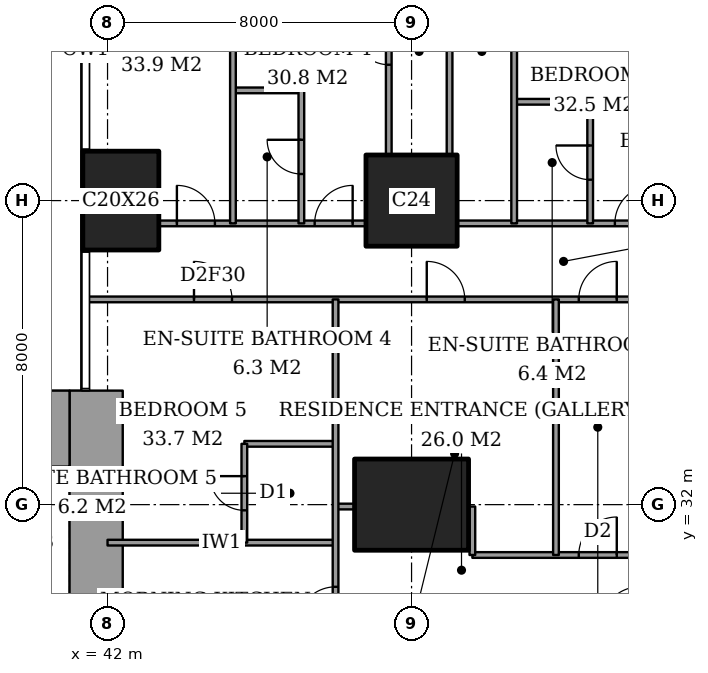
"""IFC4 building model, lengths in metres.
Left out: names, types, materials, properties, quantities, classifications, styles, units other than length and angle.
Written with IfcOpenShell. Run it as: python <this file> out.ifc"""

import sys

from ifc_helpers import new_model, si_unit, direction, frame, frame_2d, origin, origin_2d, place, context, subcontext, project, spatial, rectangle, extrude, element, fill, save


model = new_model("IFC4")
c1 = context("Model", 3, precision=1e-05, world=origin(), true_north=direction((0.0, 1.0)))
c2 = subcontext(c1, "Body", "Model", "MODEL_VIEW")
j1 = project(units=[si_unit("LENGTHUNIT", "METRE"), si_unit("PLANEANGLEUNIT", "RADIAN")], contexts=[c1])
p1 = place(None, origin())
s1 = spatial("IfcSite", under=j1, at=p1, CompositionType="ELEMENT")
p2 = place(p1, origin())
s2 = spatial("IfcBuilding", under=s1, at=p2, CompositionType="ELEMENT")
p3 = place(p2, frame((0.0, 0.0, 255.6)))
s3 = spatial("IfcBuildingStorey", under=s2, at=p3, CompositionType="ELEMENT", Elevation=255.6)
p4 = place(p3, frame((42.35, 40.0, 0.0), z_axis=(0.0, 0.0, 1.0), x_axis=(1.0, 0.0, 0.0)))
e1 = element("IfcColumn", 1, at=p4, inside=s3, PredefinedType="COLUMN", context=c2, shape_type="SweptSolid", body=[
    extrude(rectangle(XDim=2.0, YDim=2.6, at=origin_2d()), origin(), (0.0, 0.0, 1.0), 3.6),
])
p5 = place(p3, frame((50.0, 32.0, 0.0), z_axis=(0.0, 0.0, 1.0), x_axis=(1.0, 0.0, 0.0)))
e2 = element("IfcColumn", 2, at=p5, inside=s3, PredefinedType="COLUMN", context=c2, shape_type="SweptSolid", body=[
    extrude(rectangle(XDim=3.0, YDim=2.4, at=origin_2d()), origin(), (0.0, 0.0, 1.0), 3.6),
])
p6 = place(p3, frame((50.0, 40.0, 0.0), z_axis=(0.0, 0.0, 1.0), x_axis=(1.0, 0.0, 0.0)))
e3 = element("IfcColumn", 3, at=p6, inside=s3, PredefinedType="COLUMN", context=c2, shape_type="SweptSolid", body=[
    extrude(rectangle(XDim=2.4, YDim=2.4, at=origin_2d()), origin(), (0.0, 0.0, 1.0), 3.6),
])
p7 = place(p3, frame((37.85, 34.0, 0.0), z_axis=(0.0, 0.0, 1.0), x_axis=(1.0, 0.0, 0.0)))
e4 = element("IfcWall", 4, at=p7, inside=s3, PredefinedType="SHEAR", context=c2, shape_type="SweptSolid", body=[
    extrude(rectangle(XDim=3.15, YDim=2.0, at=frame_2d((1.575, 0.0))), origin(), (0.0, 0.0, 1.0), 3.6),
])
p8 = place(p3, frame((41.7, 24.85, 0.0), z_axis=(0.0, 0.0, 1.0), x_axis=(0.0, 1.0, 0.0)))
e5 = element("IfcWall", 5, at=p8, inside=s3, PredefinedType="SHEAR", context=c2, shape_type="SweptSolid", body=[
    extrude(rectangle(XDim=10.15, YDim=1.4, at=frame_2d((5.075, 0.0))), origin(), (0.0, 0.0, 1.0), 3.6),
])
p9 = place(p3, frame((51.6, 30.675, 0.0), z_axis=(0.0, 0.0, 1.0), x_axis=(1.0, 0.0, 0.0)))
e6 = element("IfcWall", 6, at=p9, inside=s3, PredefinedType="PARTITIONING", context=c2, shape_type="SweptSolid", body=[
    extrude(rectangle(XDim=4.4, YDim=0.15, at=frame_2d((2.2, 0.0))), origin(), (0.0, 0.0, 1.0), 3.35),
])
p10 = place(p9, frame((2.8, 0.0, 0.0)))
e7 = element("IfcOpeningElement", 7, at=p10, cuts=e6, PredefinedType="OPENING", context=c2, shape_type="SweptSolid", body=[
    extrude(rectangle(XDim=1.0, YDim=2.1, at=frame_2d((0.5, 1.05))), frame((0.0, 0.085, 0.0), z_axis=(0.0, -1.0, 0.0), x_axis=(1.0, 0.0, 0.0)), (0.0, 0.0, 1.0), 0.17),
])
p11 = place(p3, frame((42.0, 31.0, 0.0), z_axis=(0.0, 0.0, 1.0), x_axis=(1.0, 0.0, 0.0)))
e8 = element("IfcWall", 8, at=p11, inside=s3, PredefinedType="PARTITIONING", context=c2, shape_type="SweptSolid", body=[
    extrude(rectangle(XDim=6.0, YDim=0.15, at=frame_2d((3.0, 0.0))), origin(), (0.0, 0.0, 1.0), 3.35),
])
p12 = place(p3, frame((48.0, 31.95, 0.0), z_axis=(0.0, 0.0, 1.0), x_axis=(1.0, 0.0, 0.0)))
e9 = element("IfcWall", 9, at=p12, inside=s3, PredefinedType="PARTITIONING", context=c2, shape_type="SweptSolid", body=[
    extrude(rectangle(XDim=0.5, YDim=0.15, at=frame_2d((0.25, 0.0))), origin(), (0.0, 0.0, 1.0), 2.634),
])
p13 = place(p3, frame((45.6, 33.6, 0.0), z_axis=(0.0, 0.0, 1.0), x_axis=(1.0, 0.0, 0.0)))
e10 = element("IfcWall", 10, at=p13, inside=s3, PredefinedType="PARTITIONING", context=c2, shape_type="SweptSolid", body=[
    extrude(rectangle(XDim=2.4, YDim=0.15, at=frame_2d((1.2, 0.0))), origin(), (0.0, 0.0, 1.0), 3.35),
])
p14 = place(p3, frame((41.439, 37.4, 0.0), z_axis=(0.0, 0.0, 1.0), x_axis=(1.0, 0.0, 0.0)))
e11 = element("IfcWall", 11, at=p14, inside=s3, PredefinedType="PARTITIONING", context=c2, shape_type="SweptSolid", body=[
    extrude(rectangle(XDim=25.011, YDim=0.15, at=frame_2d((12.505, 0.0))), origin(), (0.0, 0.0, 1.0), 3.35),
])
p15 = place(p14, frame((12.961, 0.0, 0.0)))
e12 = element("IfcOpeningElement", 12, at=p15, cuts=e11, PredefinedType="OPENING", context=c2, shape_type="SweptSolid", body=[
    extrude(rectangle(XDim=1.0, YDim=2.1, at=frame_2d((0.5, 1.05))), frame((0.0, 0.085, 0.0), z_axis=(0.0, -1.0, 0.0), x_axis=(1.0, 0.0, 0.0)), (0.0, 0.0, 1.0), 0.17),
])
p16 = place(p14, frame((20.924, 0.0, 0.0)))
e13 = element("IfcOpeningElement", 13, at=p16, cuts=e11, PredefinedType="OPENING", context=c2, shape_type="SweptSolid", body=[
    extrude(rectangle(XDim=1.0, YDim=2.1, at=frame_2d((0.5, 1.05))), frame((0.0, 0.085, 0.0), z_axis=(0.0, -1.0, 0.0), x_axis=(1.0, 0.0, 0.0)), (0.0, 0.0, 1.0), 0.17),
])
p17 = place(p14, frame((15.749, 0.0, 0.0)))
e14 = element("IfcOpeningElement", 14, at=p17, cuts=e11, PredefinedType="OPENING", context=c2, shape_type="SweptSolid", body=[
    extrude(rectangle(XDim=0.9, YDim=2.1, at=frame_2d((0.45, 1.05))), frame((0.0, 0.085, 0.0), z_axis=(0.0, -1.0, 0.0), x_axis=(1.0, 0.0, 0.0)), (0.0, 0.0, 1.0), 0.17),
])
p18 = place(p14, frame((8.961, 0.0, 0.0)))
e15 = element("IfcOpeningElement", 15, at=p18, cuts=e11, PredefinedType="OPENING", context=c2, shape_type="SweptSolid", body=[
    extrude(rectangle(XDim=1.0, YDim=2.1, at=frame_2d((0.5, 1.05))), frame((0.0, 0.085, 0.0), z_axis=(0.0, -1.0, 0.0), x_axis=(1.0, 0.0, 0.0)), (0.0, 0.0, 1.0), 0.17),
])
p19 = place(p14, frame((2.836, 0.0, 0.0)))
e16 = element("IfcOpeningElement", 16, at=p19, cuts=e11, PredefinedType="OPENING", context=c2, shape_type="SweptSolid", body=[
    extrude(rectangle(XDim=1.0, YDim=2.1, at=frame_2d((0.5, 1.05))), frame((0.0, 0.085, 0.0), z_axis=(0.0, -1.0, 0.0), x_axis=(1.0, 0.0, 0.0)), (0.0, 0.0, 1.0), 0.17),
])
p20 = place(p3, frame((43.35, 39.4, 0.0), z_axis=(0.0, 0.0, 1.0), x_axis=(1.0, 0.0, 0.0)))
e17 = element("IfcWall", 17, at=p20, inside=s3, PredefinedType="PARTITIONING", context=c2, shape_type="SweptSolid", body=[
    extrude(rectangle(XDim=5.45, YDim=0.15, at=frame_2d((2.725, 0.0))), origin(), (0.0, 0.0, 1.0), 3.35),
])
p21 = place(p20, frame((4.1, 0.0, 0.0)))
e18 = element("IfcOpeningElement", 18, at=p21, cuts=e17, PredefinedType="OPENING", context=c2, shape_type="SweptSolid", body=[
    extrude(rectangle(XDim=1.0, YDim=2.1, at=frame_2d((0.5, 1.05))), frame((0.0, 0.085, 0.0), z_axis=(0.0, -1.0, 0.0), x_axis=(1.0, 0.0, 0.0)), (0.0, 0.0, 1.0), 0.17),
])
p22 = place(p20, frame((0.475, 0.0, 0.0)))
e19 = element("IfcOpeningElement", 19, at=p22, cuts=e17, PredefinedType="OPENING", context=c2, shape_type="SweptSolid", body=[
    extrude(rectangle(XDim=1.0, YDim=2.1, at=frame_2d((0.5, 1.05))), frame((0.0, 0.085, 0.0), z_axis=(0.0, -1.0, 0.0), x_axis=(1.0, 0.0, 0.0)), (0.0, 0.0, 1.0), 0.17),
])
p23 = place(p3, frame((51.2, 39.4, 0.0), z_axis=(0.0, 0.0, 1.0), x_axis=(1.0, 0.0, 0.0)))
e20 = element("IfcWall", 20, at=p23, inside=s3, PredefinedType="PARTITIONING", context=c2, shape_type="SweptSolid", body=[
    extrude(rectangle(XDim=6.0, YDim=0.15, at=frame_2d((3.0, 0.0))), origin(), (0.0, 0.0, 1.0), 3.35),
])
p24 = place(p23, frame((4.15, 0.0, 0.0)))
e21 = element("IfcOpeningElement", 21, at=p24, cuts=e20, PredefinedType="OPENING", context=c2, shape_type="SweptSolid", body=[
    extrude(rectangle(XDim=1.0, YDim=2.1, at=frame_2d((0.5, 1.05))), frame((0.0, 0.085, 0.0), z_axis=(0.0, -1.0, 0.0), x_axis=(1.0, 0.0, 0.0)), (0.0, 0.0, 1.0), 0.17),
])
p25 = place(p3, frame((52.7, 42.6, 0.0), z_axis=(0.0, 0.0, 1.0), x_axis=(1.0, 0.0, 0.0)))
e22 = element("IfcWall", 22, at=p25, inside=s3, PredefinedType="PARTITIONING", context=c2, shape_type="SweptSolid", body=[
    extrude(rectangle(XDim=2.0, YDim=0.15, at=frame_2d((1.0, 0.0))), origin(), (0.0, 0.0, 1.0), 3.35),
])
p26 = place(p3, frame((45.3, 42.9, 0.0), z_axis=(0.0, 0.0, 1.0), x_axis=(1.0, 0.0, 0.0)))
e23 = element("IfcWall", 23, at=p26, inside=s3, PredefinedType="PARTITIONING", context=c2, shape_type="SweptSolid", body=[
    extrude(rectangle(XDim=1.8, YDim=0.15, at=frame_2d((0.9, 0.0))), origin(), (0.0, 0.0, 1.0), 3.35),
])
p27 = place(p3, frame((45.3, 39.4, 0.0), z_axis=(0.0, 0.0, 1.0), x_axis=(0.0, 1.0, 0.0)))
e24 = element("IfcWall", 24, at=p27, inside=s3, PredefinedType="PARTITIONING", context=c2, shape_type="SweptSolid", body=[
    extrude(rectangle(XDim=9.05, YDim=0.15, at=frame_2d((4.525, 0.0))), origin(), (0.0, 0.0, 1.0), 3.35),
])
p28 = place(p3, frame((45.6, 31.0, 0.0), z_axis=(0.0, 0.0, 1.0), x_axis=(0.0, 1.0, 0.0)))
e25 = element("IfcWall", 25, at=p28, inside=s3, PredefinedType="PARTITIONING", context=c2, shape_type="SweptSolid", body=[
    extrude(rectangle(XDim=2.6, YDim=0.15, at=frame_2d((1.3, 0.0))), origin(), (0.0, 0.0, 1.0), 3.35),
])
p29 = place(p28, frame((0.85, 0.0, 0.0)))
e26 = element("IfcOpeningElement", 26, at=p29, cuts=e25, PredefinedType="OPENING", context=c2, shape_type="SweptSolid", body=[
    extrude(rectangle(XDim=0.9, YDim=2.1, at=frame_2d((0.45, 1.05))), frame((0.0, 0.085, 0.0), z_axis=(0.0, -1.0, 0.0), x_axis=(1.0, 0.0, 0.0)), (0.0, 0.0, 1.0), 0.17),
])
p30 = place(p3, frame((47.1, 39.4, 0.0), z_axis=(0.0, 0.0, 1.0), x_axis=(0.0, 1.0, 0.0)))
e27 = element("IfcWall", 27, at=p30, inside=s3, PredefinedType="PARTITIONING", context=c2, shape_type="SweptSolid", body=[
    extrude(rectangle(XDim=3.5, YDim=0.15, at=frame_2d((1.75, 0.0))), origin(), (0.0, 0.0, 1.0), 3.35),
])
p31 = place(p30, frame((1.3, 0.0, 0.0)))
e28 = element("IfcOpeningElement", 28, at=p31, cuts=e27, PredefinedType="OPENING", context=c2, shape_type="SweptSolid", body=[
    extrude(rectangle(XDim=0.9, YDim=2.1, at=frame_2d((0.45, 1.05))), frame((0.0, 0.085, 0.0), z_axis=(0.0, -1.0, 0.0), x_axis=(1.0, 0.0, 0.0)), (0.0, 0.0, 1.0), 0.17),
])
p32 = place(p3, frame((48.0, 28.0, 0.0), z_axis=(0.0, 0.0, 1.0), x_axis=(0.0, 1.0, 0.0)))
e29 = element("IfcWall", 29, at=p32, inside=s3, PredefinedType="PARTITIONING", context=c2, shape_type="SweptSolid", body=[
    extrude(rectangle(XDim=9.4, YDim=0.15, at=frame_2d((4.7, 0.0))), origin(), (0.0, 0.0, 1.0), 3.35),
])
p33 = place(p32, frame((0.837, 0.0, 0.0)))
e30 = element("IfcOpeningElement", 30, at=p33, cuts=e29, PredefinedType="OPENING", context=c2, shape_type="SweptSolid", body=[
    extrude(rectangle(XDim=1.0, YDim=2.1, at=frame_2d((0.5, 1.05))), frame((0.0, 0.085, 0.0), z_axis=(0.0, -1.0, 0.0), x_axis=(1.0, 0.0, 0.0)), (0.0, 0.0, 1.0), 0.17),
])
p34 = place(p3, frame((49.4, 41.2, 0.0), z_axis=(0.0, 0.0, 1.0), x_axis=(0.0, 1.0, 0.0)))
e31 = element("IfcWall", 31, at=p34, inside=s3, PredefinedType="PARTITIONING", context=c2, shape_type="SweptSolid", body=[
    extrude(rectangle(XDim=5.65, YDim=0.15, at=frame_2d((2.825, 0.0))), origin(), (0.0, 0.0, 1.0), 3.35),
])
p35 = place(p34, frame((2.375, 0.0, 0.0)))
e32 = element("IfcOpeningElement", 32, at=p35, cuts=e31, PredefinedType="OPENING", context=c2, shape_type="SweptSolid", body=[
    extrude(rectangle(XDim=0.9, YDim=2.1, at=frame_2d((0.45, 1.05))), frame((0.0, 0.085, 0.0), z_axis=(0.0, -1.0, 0.0), x_axis=(1.0, 0.0, 0.0)), (0.0, 0.0, 1.0), 0.17),
])
p36 = place(p3, frame((51.0, 41.2, 0.0), z_axis=(0.0, 0.0, 1.0), x_axis=(0.0, 1.0, 0.0)))
e33 = element("IfcWall", 33, at=p36, inside=s3, PredefinedType="PARTITIONING", context=c2, shape_type="SweptSolid", body=[
    extrude(rectangle(XDim=7.25, YDim=0.15, at=frame_2d((3.625, 0.0))), origin(), (0.0, 0.0, 1.0), 3.35),
])
p37 = place(p3, frame((51.6, 30.675, 0.0), z_axis=(0.0, 0.0, 1.0), x_axis=(0.0, 1.0, 0.0)))
e34 = element("IfcWall", 34, at=p37, inside=s3, PredefinedType="PARTITIONING", context=c2, shape_type="SweptSolid", body=[
    extrude(rectangle(XDim=1.275, YDim=0.15, at=frame_2d((0.637, 0.0))), origin(), (0.0, 0.0, 1.0), 3.35),
])
p38 = place(p3, frame((52.7, 39.4, 0.0), z_axis=(0.0, 0.0, 1.0), x_axis=(0.0, 1.0, 0.0)))
e35 = element("IfcWall", 35, at=p38, inside=s3, PredefinedType="PARTITIONING", context=c2, shape_type="SweptSolid", body=[
    extrude(rectangle(XDim=9.05, YDim=0.15, at=frame_2d((4.525, 0.0))), origin(), (0.0, 0.0, 1.0), 3.35),
])
p39 = place(p38, frame((5.675, 0.0, 0.0)))
e36 = element("IfcOpeningElement", 36, at=p39, cuts=e35, PredefinedType="OPENING", context=c2, shape_type="SweptSolid", body=[
    extrude(rectangle(XDim=0.9, YDim=2.1, at=frame_2d((0.45, 1.05))), frame((0.0, 0.085, 0.0), z_axis=(0.0, -1.0, 0.0), x_axis=(1.0, 0.0, 0.0)), (0.0, 0.0, 1.0), 0.17),
])
p40 = place(p3, frame((53.8, 30.675, 0.0), z_axis=(0.0, 0.0, 1.0), x_axis=(0.0, 1.0, 0.0)))
e37 = element("IfcWall", 37, at=p40, inside=s3, PredefinedType="PARTITIONING", context=c2, shape_type="SweptSolid", body=[
    extrude(rectangle(XDim=6.725, YDim=0.15, at=frame_2d((3.362, 0.0))), origin(), (0.0, 0.0, 1.0), 3.35),
])
p41 = place(p3, frame((54.7, 39.4, 0.0), z_axis=(0.0, 0.0, 1.0), x_axis=(0.0, 1.0, 0.0)))
e38 = element("IfcWall", 38, at=p41, inside=s3, PredefinedType="PARTITIONING", context=c2, shape_type="SweptSolid", body=[
    extrude(rectangle(XDim=3.2, YDim=0.15, at=frame_2d((1.6, 0.0))), origin(), (0.0, 0.0, 1.0), 3.35),
])
p42 = place(p41, frame((1.15, 0.0, 0.0)))
e39 = element("IfcOpeningElement", 39, at=p42, cuts=e38, PredefinedType="OPENING", context=c2, shape_type="SweptSolid", body=[
    extrude(rectangle(XDim=0.9, YDim=2.1, at=frame_2d((0.45, 1.05))), frame((0.0, 0.085, 0.0), z_axis=(0.0, -1.0, 0.0), x_axis=(1.0, 0.0, 0.0)), (0.0, 0.0, 1.0), 0.17),
])
p43 = place(p42, origin())
e40 = element("IfcDoor", 40, at=p43, inside=s3, OperationType="SINGLE_SWING_LEFT", PredefinedType="DOOR", context=c2, shape_type="SweptSolid", body=[
    extrude(rectangle(XDim=0.9, YDim=2.1, at=frame_2d((0.45, 1.05))), frame((0.0, 0.025, 0.0), z_axis=(0.0, -1.0, 0.0), x_axis=(1.0, 0.0, 0.0)), (0.0, 0.0, 1.0), 0.05),
])
fill(e39, e40)
p44 = place(p24, origin())
e41 = element("IfcDoor", 41, at=p44, inside=s3, OperationType="SINGLE_SWING_LEFT", PredefinedType="DOOR", context=c2, shape_type="SweptSolid", body=[
    extrude(rectangle(XDim=1.0, YDim=2.1, at=frame_2d((0.5, 1.05))), frame((0.0, 0.025, 0.0), z_axis=(0.0, -1.0, 0.0), x_axis=(1.0, 0.0, 0.0)), (0.0, 0.0, 1.0), 0.05),
])
fill(e21, e41)
p45 = place(p35, origin())
e42 = element("IfcDoor", 42, at=p45, inside=s3, OperationType="SINGLE_SWING_LEFT", PredefinedType="DOOR", context=c2, shape_type="SweptSolid", body=[
    extrude(rectangle(XDim=0.9, YDim=2.1, at=frame_2d((0.45, 1.05))), frame((0.0, 0.025, 0.0), z_axis=(0.0, -1.0, 0.0), x_axis=(1.0, 0.0, 0.0)), (0.0, 0.0, 1.0), 0.05),
])
fill(e32, e42)
p46 = place(p31, origin())
e43 = element("IfcDoor", 43, at=p46, inside=s3, OperationType="SINGLE_SWING_LEFT", PredefinedType="DOOR", context=c2, shape_type="SweptSolid", body=[
    extrude(rectangle(XDim=0.9, YDim=2.1, at=frame_2d((0.45, 1.05))), frame((0.0, 0.025, 0.0), z_axis=(0.0, -1.0, 0.0), x_axis=(1.0, 0.0, 0.0)), (0.0, 0.0, 1.0), 0.05),
])
fill(e28, e43)
p47 = place(p21, origin())
e44 = element("IfcDoor", 44, at=p47, inside=s3, OperationType="SINGLE_SWING_LEFT", PredefinedType="DOOR", context=c2, shape_type="SweptSolid", body=[
    extrude(rectangle(XDim=1.0, YDim=2.1, at=frame_2d((0.5, 1.05))), frame((0.0, 0.025, 0.0), z_axis=(0.0, -1.0, 0.0), x_axis=(1.0, 0.0, 0.0)), (0.0, 0.0, 1.0), 0.05),
])
fill(e18, e44)
p48 = place(p22, origin())
e45 = element("IfcDoor", 45, at=p48, inside=s3, OperationType="SINGLE_SWING_RIGHT", PredefinedType="DOOR", context=c2, shape_type="SweptSolid", body=[
    extrude(rectangle(XDim=1.0, YDim=2.1, at=frame_2d((0.5, 1.05))), frame((0.0, 0.025, 0.0), z_axis=(0.0, -1.0, 0.0), x_axis=(1.0, 0.0, 0.0)), (0.0, 0.0, 1.0), 0.05),
])
fill(e19, e45)
p49 = place(p15, origin())
e46 = element("IfcDoor", 46, at=p49, inside=s3, OperationType="SINGLE_SWING_LEFT", PredefinedType="DOOR", context=c2, shape_type="SweptSolid", body=[
    extrude(rectangle(XDim=1.0, YDim=2.1, at=frame_2d((0.5, 1.05))), frame((0.0, 0.025, 0.0), z_axis=(0.0, -1.0, 0.0), x_axis=(1.0, 0.0, 0.0)), (0.0, 0.0, 1.0), 0.05),
])
fill(e12, e46)
p50 = place(p10, origin())
e47 = element("IfcDoor", 47, at=p50, inside=s3, OperationType="SINGLE_SWING_LEFT", PredefinedType="DOOR", context=c2, shape_type="SweptSolid", body=[
    extrude(rectangle(XDim=1.0, YDim=2.1, at=frame_2d((0.5, 1.05))), frame((0.0, 0.025, 0.0), z_axis=(0.0, -1.0, 0.0), x_axis=(1.0, 0.0, 0.0)), (0.0, 0.0, 1.0), 0.05),
])
fill(e7, e47)
p51 = place(p18, origin())
e48 = element("IfcDoor", 48, at=p51, inside=s3, OperationType="SINGLE_SWING_RIGHT", PredefinedType="DOOR", context=c2, shape_type="SweptSolid", body=[
    extrude(rectangle(XDim=1.0, YDim=2.1, at=frame_2d((0.5, 1.05))), frame((0.0, 0.025, 0.0), z_axis=(0.0, -1.0, 0.0), x_axis=(1.0, 0.0, 0.0)), (0.0, 0.0, 1.0), 0.05),
])
fill(e15, e48)
p52 = place(p29, origin())
e49 = element("IfcDoor", 49, at=p52, inside=s3, OperationType="SINGLE_SWING_LEFT", PredefinedType="DOOR", context=c2, shape_type="SweptSolid", body=[
    extrude(rectangle(XDim=0.9, YDim=2.1, at=frame_2d((0.45, 1.05))), frame((0.0, 0.025, 0.0), z_axis=(0.0, -1.0, 0.0), x_axis=(1.0, 0.0, 0.0)), (0.0, 0.0, 1.0), 0.05),
])
fill(e26, e49)
p53 = place(p19, origin())
e50 = element("IfcDoor", 50, at=p53, inside=s3, OperationType="SINGLE_SWING_RIGHT", PredefinedType="DOOR", context=c2, shape_type="SweptSolid", body=[
    extrude(rectangle(XDim=1.0, YDim=2.1, at=frame_2d((0.5, 1.05))), frame((0.0, 0.025, 0.0), z_axis=(0.0, -1.0, 0.0), x_axis=(1.0, 0.0, 0.0)), (0.0, 0.0, 1.0), 0.05),
])
fill(e16, e50)
p54 = place(p33, origin())
e51 = element("IfcDoor", 51, at=p54, inside=s3, OperationType="SINGLE_SWING_RIGHT", PredefinedType="DOOR", context=c2, shape_type="SweptSolid", body=[
    extrude(rectangle(XDim=1.0, YDim=2.1, at=frame_2d((0.5, 1.05))), frame((0.0, 0.025, 0.0), z_axis=(0.0, -1.0, 0.0), x_axis=(1.0, 0.0, 0.0)), (0.0, 0.0, 1.0), 0.05),
])
fill(e30, e51)
save(model, sys.argv[1])
